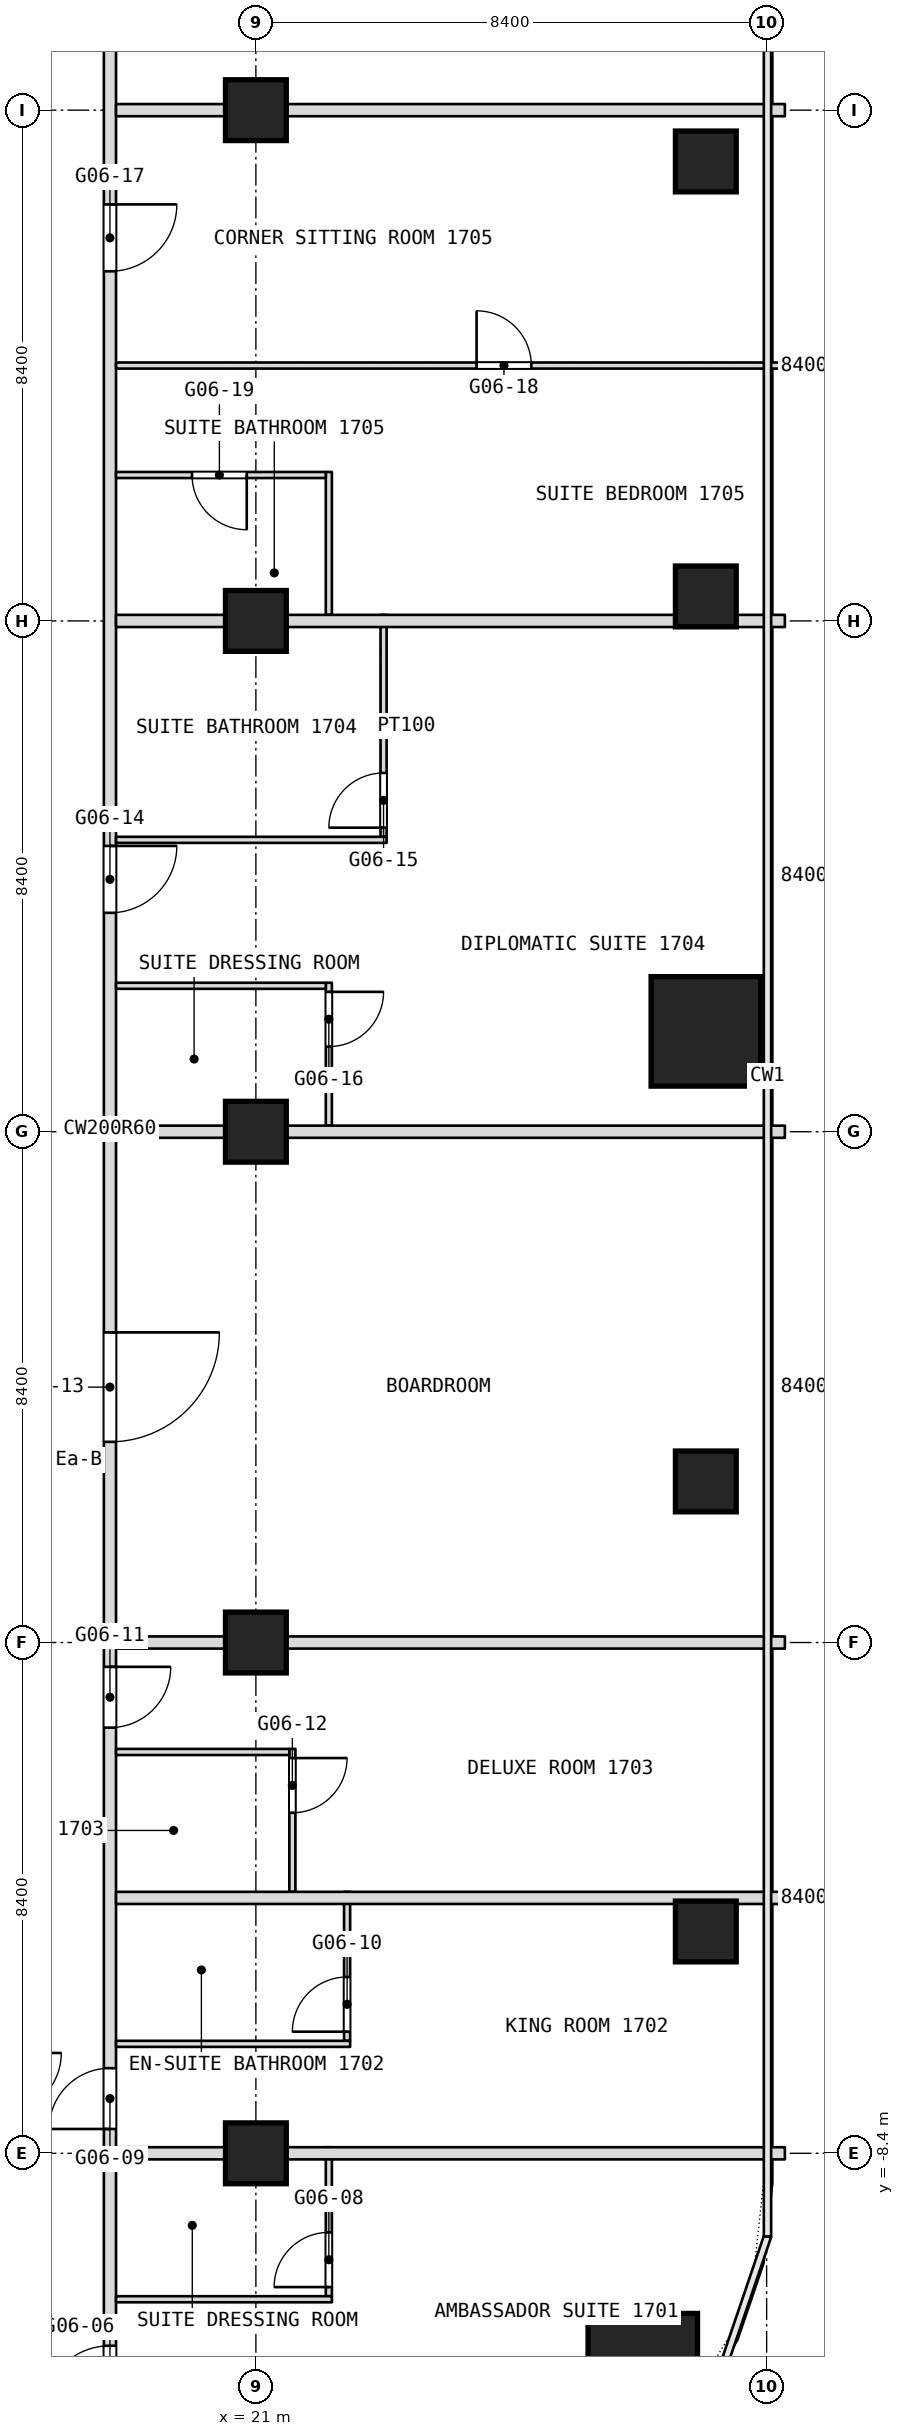
"""IFC4 building model, lengths in metres.
Left out: names, types, materials, properties, quantities, classifications, styles, units other than length and angle.
Written with IfcOpenShell. Run it as: python <this file> out.ifc"""

import sys

from ifc_helpers import new_model, si_unit, direction, frame, frame_2d, origin, origin_2d, place, context, subcontext, project, spatial, rectangle, extrude, element, fill, save


model = new_model("IFC4")
c1 = context("Model", 3, precision=1e-05, world=origin(), true_north=direction((0.0, 1.0)))
c2 = subcontext(c1, "Body", "Model", "MODEL_VIEW")
j1 = project(units=[si_unit("LENGTHUNIT", "METRE"), si_unit("PLANEANGLEUNIT", "RADIAN")], contexts=[c1])
p1 = place(None, origin())
s1 = spatial("IfcSite", under=j1, at=p1, CompositionType="ELEMENT")
p2 = place(p1, origin())
s2 = spatial("IfcBuilding", under=s1, at=p2, CompositionType="ELEMENT")
p3 = place(p2, frame((0.0, 0.0, 76.1)))
s3 = spatial("IfcBuildingStorey", under=s2, at=p3, CompositionType="ELEMENT", Elevation=76.1)
for number, where, z_axis, x_axis in (
    (1, (27.363, -11.933, 0.0), (0.0, 0.0, 1.0), (1.0, 0.0, 0.0)),
    (2, (28.4, 10.05, 0.0), (0.0, 0.0, 1.0), (1.0, 0.0, 0.0)),
):
    element("IfcColumn", number, at=place(p3, frame(where, z_axis=z_axis, x_axis=x_axis)), inside=s3, PredefinedType="COLUMN", context=c2, shape_type="SweptSolid", body=[
        extrude(rectangle(XDim=1.8, YDim=1.8, at=origin_2d()), origin(), (0.0, 0.0, 1.0), 3.6),
    ])
for number, where, z_axis, x_axis in (
    (3, (21.0, -8.4, 0.0), (0.0, 0.0, 1.0), (1.0, 0.0, 0.0)),
    (4, (21.0, 0.0, 0.0), (0.0, 0.0, 1.0), (1.0, 0.0, 0.0)),
    (5, (21.0, 8.4, 0.0), (0.0, 0.0, 1.0), (1.0, 0.0, 0.0)),
    (6, (21.0, 16.8, 0.0), (0.0, 0.0, 1.0), (1.0, 0.0, 0.0)),
    (7, (21.0, 25.2, 0.0), (0.0, 0.0, 1.0), (1.0, 0.0, 0.0)),
    (8, (28.4, 24.356, 0.0), (0.0, 0.0, 1.0), (1.0, 0.0, 0.0)),
    (9, (28.4, 17.203, 0.0), (0.0, 0.0, 1.0), (1.0, 0.0, 0.0)),
    (10, (28.4, 2.649, 0.0), (0.0, 0.0, 1.0), (1.0, 0.0, 0.0)),
    (11, (28.4, -4.752, 0.0), (0.0, 0.0, 1.0), (1.0, 0.0, 0.0)),
):
    element("IfcColumn", number, at=place(p3, frame(where, z_axis=z_axis, x_axis=x_axis)), inside=s3, PredefinedType="COLUMN", context=c2, shape_type="SweptSolid", body=[
        extrude(rectangle(XDim=1.0, YDim=1.0, at=origin_2d()), origin(), (0.0, 0.0, 1.0), 3.6),
    ])
p4 = place(p3, frame((23.1, 13.25, 0.0), z_axis=(0.0, 0.0, 1.0), x_axis=(0.0, 1.0, 0.0)))
e12 = element("IfcWall", 12, at=p4, inside=s3, PredefinedType="PARTITIONING", context=c2, shape_type="SweptSolid", body=[
    extrude(rectangle(XDim=3.65, YDim=0.1, at=frame_2d((1.825, 0.0))), origin(), (0.0, 0.0, 1.0), 3.34),
])
p5 = place(p4, frame((0.15, 0.0, 0.0)))
e13 = element("IfcOpeningElement", 13, at=p5, cuts=e12, PredefinedType="OPENING", context=c2, shape_type="SweptSolid", body=[
    extrude(rectangle(XDim=0.9, YDim=2.1, at=frame_2d((0.45, 1.05))), frame((0.0, 0.05, 0.0), z_axis=(0.0, -1.0, 0.0), x_axis=(1.0, 0.0, 0.0)), (0.0, 0.0, 1.0), 0.1),
])
p6 = place(p3, frame((22.5, -6.55, 0.0), z_axis=(0.0, 0.0, 1.0), x_axis=(0.0, 1.0, 0.0)))
e14 = element("IfcWall", 14, at=p6, inside=s3, PredefinedType="PARTITIONING", context=c2, shape_type="SweptSolid", body=[
    extrude(rectangle(XDim=2.45, YDim=0.1, at=frame_2d((1.225, 0.0))), origin(), (0.0, 0.0, 1.0), 3.34),
])
p7 = place(p6, frame((0.15, 0.0, 0.0)))
e15 = element("IfcOpeningElement", 15, at=p7, cuts=e14, PredefinedType="OPENING", context=c2, shape_type="SweptSolid", body=[
    extrude(rectangle(XDim=0.9, YDim=2.1, at=frame_2d((0.45, 1.05))), frame((0.0, 0.05, 0.0), z_axis=(0.0, -1.0, 0.0), x_axis=(1.0, 0.0, 0.0)), (0.0, 0.0, 1.0), 0.1),
])
p8 = place(p3, frame((22.2, -10.75, 0.0), z_axis=(0.0, 0.0, 1.0), x_axis=(0.0, 1.0, 0.0)))
e16 = element("IfcWall", 16, at=p8, inside=s3, PredefinedType="PARTITIONING", context=c2, shape_type="SweptSolid", body=[
    extrude(rectangle(XDim=2.45, YDim=0.1, at=frame_2d((1.225, 0.0))), origin(), (0.0, 0.0, 1.0), 3.34),
])
p9 = place(p8, frame((0.15, 0.0, 0.0)))
e17 = element("IfcOpeningElement", 17, at=p9, cuts=e16, PredefinedType="OPENING", context=c2, shape_type="SweptSolid", body=[
    extrude(rectangle(XDim=0.9, YDim=2.1, at=frame_2d((0.45, 1.05))), frame((0.0, 0.05, 0.0), z_axis=(0.0, -1.0, 0.0), x_axis=(1.0, 0.0, 0.0)), (0.0, 0.0, 1.0), 0.1),
])
p10 = place(p3, frame((22.2, 8.5, 0.0), z_axis=(0.0, 0.0, 1.0), x_axis=(0.0, 1.0, 0.0)))
e18 = element("IfcWall", 18, at=p10, inside=s3, PredefinedType="PARTITIONING", context=c2, shape_type="SweptSolid", body=[
    extrude(rectangle(XDim=2.35, YDim=0.1, at=frame_2d((1.175, 0.0))), origin(), (0.0, 0.0, 1.0), 3.34),
])
p11 = place(p10, frame((1.3, 0.0, 0.0)))
e19 = element("IfcOpeningElement", 19, at=p11, cuts=e18, PredefinedType="OPENING", context=c2, shape_type="SweptSolid", body=[
    extrude(rectangle(XDim=0.9, YDim=2.1, at=frame_2d((0.45, 1.05))), frame((0.0, 0.05, 0.0), z_axis=(0.0, -1.0, 0.0), x_axis=(1.0, 0.0, 0.0)), (0.0, 0.0, 1.0), 0.1),
])
p12 = place(p3, frame((22.2, 16.9, 0.0), z_axis=(0.0, 0.0, 1.0), x_axis=(0.0, 1.0, 0.0)))
e20 = element("IfcWall", 20, at=p12, inside=s3, PredefinedType="PARTITIONING", context=c2, shape_type="SweptSolid", body=[
    extrude(rectangle(XDim=2.35, YDim=0.1, at=frame_2d((1.175, 0.0))), origin(), (0.0, 0.0, 1.0), 3.34),
])
p13 = place(p3, frame((21.6, -4.1, 0.0), z_axis=(0.0, 0.0, 1.0), x_axis=(0.0, 1.0, 0.0)))
e21 = element("IfcWall", 21, at=p13, inside=s3, PredefinedType="PARTITIONING", context=c2, shape_type="SweptSolid", body=[
    extrude(rectangle(XDim=2.35, YDim=0.1, at=frame_2d((1.175, 0.0))), origin(), (0.0, 0.0, 1.0), 3.34),
])
p14 = place(p13, frame((1.3, 0.0, 0.0)))
e22 = element("IfcOpeningElement", 22, at=p14, cuts=e21, PredefinedType="OPENING", context=c2, shape_type="SweptSolid", body=[
    extrude(rectangle(XDim=0.9, YDim=2.1, at=frame_2d((0.45, 1.05))), frame((0.0, 0.05, 0.0), z_axis=(0.0, -1.0, 0.0), x_axis=(1.0, 0.0, 0.0)), (0.0, 0.0, 1.0), 0.1),
])
p15 = place(p3, frame((18.6, -16.665, 0.0), z_axis=(0.0, 0.0, 1.0), x_axis=(0.0, 1.0, 0.0)))
e23 = element("IfcWall", 23, at=p15, inside=s3, PredefinedType="PARTITIONING", context=c2, shape_type="SweptSolid", body=[
    extrude(rectangle(XDim=50.205, YDim=0.2, at=frame_2d((25.103, 0.0))), origin(), (0.0, 0.0, 1.0), 3.34),
])
p16 = place(p15, frame((4.0, 0.0, 0.0)))
e24 = element("IfcOpeningElement", 24, at=p16, cuts=e23, PredefinedType="OPENING", context=c2, shape_type="SweptSolid", body=[
    extrude(rectangle(XDim=1.1, YDim=2.1, at=frame_2d((0.55, 1.05))), frame((0.0, 0.1, 0.0), z_axis=(0.0, -1.0, 0.0), x_axis=(1.0, 0.0, 0.0)), (0.0, 0.0, 1.0), 0.2),
])
p17 = place(p15, frame((8.665, 0.0, 0.0)))
e25 = element("IfcOpeningElement", 25, at=p17, cuts=e23, PredefinedType="OPENING", context=c2, shape_type="SweptSolid", body=[
    extrude(rectangle(XDim=1.0, YDim=2.1, at=frame_2d((0.5, 1.05))), frame((0.0, 0.1, 0.0), z_axis=(0.0, -1.0, 0.0), x_axis=(1.0, 0.0, 0.0)), (0.0, 0.0, 1.0), 0.2),
])
p18 = place(p15, frame((15.265, 0.0, 0.0)))
e26 = element("IfcOpeningElement", 26, at=p18, cuts=e23, PredefinedType="OPENING", context=c2, shape_type="SweptSolid", body=[
    extrude(rectangle(XDim=1.0, YDim=2.1, at=frame_2d((0.5, 1.05))), frame((0.0, 0.1, 0.0), z_axis=(0.0, -1.0, 0.0), x_axis=(1.0, 0.0, 0.0)), (0.0, 0.0, 1.0), 0.2),
])
p19 = place(p15, frame((19.965, 0.0, 0.0)))
e27 = element("IfcOpeningElement", 27, at=p19, cuts=e23, PredefinedType="OPENING", context=c2, shape_type="SweptSolid", body=[
    extrude(rectangle(XDim=1.8, YDim=2.1, at=frame_2d((0.9, 1.05))), frame((0.0, 0.1, 0.0), z_axis=(0.0, -1.0, 0.0), x_axis=(1.0, 0.0, 0.0)), (0.0, 0.0, 1.0), 0.2),
])
p20 = place(p15, frame((28.665, 0.0, 0.0)))
e28 = element("IfcOpeningElement", 28, at=p20, cuts=e23, PredefinedType="OPENING", context=c2, shape_type="SweptSolid", body=[
    extrude(rectangle(XDim=1.1, YDim=2.1, at=frame_2d((0.55, 1.05))), frame((0.0, 0.1, 0.0), z_axis=(0.0, -1.0, 0.0), x_axis=(1.0, 0.0, 0.0)), (0.0, 0.0, 1.0), 0.2),
])
p21 = place(p15, frame((39.215, 0.0, 0.0)))
e29 = element("IfcOpeningElement", 29, at=p21, cuts=e23, PredefinedType="OPENING", context=c2, shape_type="SweptSolid", body=[
    extrude(rectangle(XDim=1.1, YDim=2.1, at=frame_2d((0.55, 1.05))), frame((0.0, 0.1, 0.0), z_axis=(0.0, -1.0, 0.0), x_axis=(1.0, 0.0, 0.0)), (0.0, 0.0, 1.0), 0.2),
])
p22 = place(p15, frame((45.165, 0.0, 0.0)))
e30 = element("IfcOpeningElement", 30, at=p22, cuts=e23, PredefinedType="OPENING", context=c2, shape_type="SweptSolid", body=[
    extrude(rectangle(XDim=1.8, YDim=2.1, at=frame_2d((0.9, 1.05))), frame((0.0, 0.1, 0.0), z_axis=(0.0, -1.0, 0.0), x_axis=(1.0, 0.0, 0.0)), (0.0, 0.0, 1.0), 0.2),
])
p23 = place(p3, frame((18.7, -10.8, 0.0), z_axis=(0.0, 0.0, 1.0), x_axis=(1.0, 0.0, 0.0)))
e31 = element("IfcWall", 31, at=p23, inside=s3, PredefinedType="PARTITIONING", context=c2, shape_type="SweptSolid", body=[
    extrude(rectangle(XDim=3.55, YDim=0.1, at=frame_2d((1.775, 0.0))), origin(), (0.0, 0.0, 1.0), 3.34),
])
p24 = place(p3, frame((18.7, -8.4, 0.0), z_axis=(0.0, 0.0, 1.0), x_axis=(1.0, 0.0, 0.0)))
e32 = element("IfcWall", 32, at=p24, inside=s3, PredefinedType="PARTITIONING", context=c2, shape_type="SweptSolid", body=[
    extrude(rectangle(XDim=11.0, YDim=0.2, at=frame_2d((5.5, 0.0))), origin(), (0.0, 0.0, 1.0), 2.84),
])
p25 = place(p3, frame((18.7, -6.6, 0.0), z_axis=(0.0, 0.0, 1.0), x_axis=(1.0, 0.0, 0.0)))
e33 = element("IfcWall", 33, at=p25, inside=s3, PredefinedType="PARTITIONING", context=c2, shape_type="SweptSolid", body=[
    extrude(rectangle(XDim=3.85, YDim=0.1, at=frame_2d((1.925, 0.0))), origin(), (0.0, 0.0, 1.0), 3.34),
])
p26 = place(p3, frame((18.7, -4.2, 0.0), z_axis=(0.0, 0.0, 1.0), x_axis=(1.0, 0.0, 0.0)))
e34 = element("IfcWall", 34, at=p26, inside=s3, PredefinedType="PARTITIONING", context=c2, shape_type="SweptSolid", body=[
    extrude(rectangle(XDim=11.0, YDim=0.2, at=frame_2d((5.5, 0.0))), origin(), (0.0, 0.0, 1.0), 3.34),
])
p27 = place(p3, frame((18.7, -1.8, 0.0), z_axis=(0.0, 0.0, 1.0), x_axis=(1.0, 0.0, 0.0)))
e35 = element("IfcWall", 35, at=p27, inside=s3, PredefinedType="PARTITIONING", context=c2, shape_type="SweptSolid", body=[
    extrude(rectangle(XDim=2.85, YDim=0.1, at=frame_2d((1.425, 0.0))), origin(), (0.0, 0.0, 1.0), 3.34),
])
for number, where, z_axis, x_axis in (
    (36, (18.7, 0.0, 0.0), (0.0, 0.0, 1.0), (1.0, 0.0, 0.0)),
    (37, (18.7, 8.4, 0.0), (0.0, 0.0, 1.0), (1.0, 0.0, 0.0)),
):
    element("IfcWall", number, at=place(p3, frame(where, z_axis=z_axis, x_axis=x_axis)), inside=s3, PredefinedType="PARTITIONING", context=c2, shape_type="SweptSolid", body=[
        extrude(rectangle(XDim=11.0, YDim=0.2, at=frame_2d((5.5, 0.0))), origin(), (0.0, 0.0, 1.0), 2.84),
    ])
p28 = place(p3, frame((18.7, 10.8, 0.0), z_axis=(0.0, 0.0, 1.0), x_axis=(1.0, 0.0, 0.0)))
e38 = element("IfcWall", 38, at=p28, inside=s3, PredefinedType="PARTITIONING", context=c2, shape_type="SweptSolid", body=[
    extrude(rectangle(XDim=3.45, YDim=0.1, at=frame_2d((1.725, 0.0))), origin(), (0.0, 0.0, 1.0), 3.34),
])
p29 = place(p3, frame((18.7, 13.2, 0.0), z_axis=(0.0, 0.0, 1.0), x_axis=(1.0, 0.0, 0.0)))
e39 = element("IfcWall", 39, at=p29, inside=s3, PredefinedType="PARTITIONING", context=c2, shape_type="SweptSolid", body=[
    extrude(rectangle(XDim=4.45, YDim=0.1, at=frame_2d((2.225, 0.0))), origin(), (0.0, 0.0, 1.0), 3.34),
])
p30 = place(p3, frame((18.7, 16.8, 0.0), z_axis=(0.0, 0.0, 1.0), x_axis=(1.0, 0.0, 0.0)))
e40 = element("IfcWall", 40, at=p30, inside=s3, PredefinedType="PARTITIONING", context=c2, shape_type="SweptSolid", body=[
    extrude(rectangle(XDim=11.0, YDim=0.2, at=frame_2d((5.5, 0.0))), origin(), (0.0, 0.0, 1.0), 2.84),
])
p31 = place(p3, frame((18.7, 19.2, 0.0), z_axis=(0.0, 0.0, 1.0), x_axis=(1.0, 0.0, 0.0)))
e41 = element("IfcWall", 41, at=p31, inside=s3, PredefinedType="PARTITIONING", context=c2, shape_type="SweptSolid", body=[
    extrude(rectangle(XDim=3.45, YDim=0.1, at=frame_2d((1.725, 0.0))), origin(), (0.0, 0.0, 1.0), 3.34),
])
p32 = place(p31, frame((1.25, 0.0, 0.0)))
e42 = element("IfcOpeningElement", 42, at=p32, cuts=e41, PredefinedType="OPENING", context=c2, shape_type="SweptSolid", body=[
    extrude(rectangle(XDim=0.9, YDim=2.1, at=frame_2d((0.45, 1.05))), frame((0.0, 0.05, 0.0), z_axis=(0.0, -1.0, 0.0), x_axis=(1.0, 0.0, 0.0)), (0.0, 0.0, 1.0), 0.1),
])
p33 = place(p3, frame((18.7, 21.0, 0.0), z_axis=(0.0, 0.0, 1.0), x_axis=(1.0, 0.0, 0.0)))
e43 = element("IfcWall", 43, at=p33, inside=s3, PredefinedType="PARTITIONING", context=c2, shape_type="SweptSolid", body=[
    extrude(rectangle(XDim=11.0, YDim=0.1, at=frame_2d((5.5, 0.0))), origin(), (0.0, 0.0, 1.0), 3.34),
])
p34 = place(p33, frame((5.93, 0.0, 0.0)))
e44 = element("IfcOpeningElement", 44, at=p34, cuts=e43, PredefinedType="OPENING", context=c2, shape_type="SweptSolid", body=[
    extrude(rectangle(XDim=0.9, YDim=2.1, at=frame_2d((0.45, 1.05))), frame((0.0, 0.05, 0.0), z_axis=(0.0, -1.0, 0.0), x_axis=(1.0, 0.0, 0.0)), (0.0, 0.0, 1.0), 0.1),
])
p35 = place(p3, frame((18.7, 25.2, 0.0), z_axis=(0.0, 0.0, 1.0), x_axis=(1.0, 0.0, 0.0)))
e45 = element("IfcWall", 45, at=p35, inside=s3, PredefinedType="PARTITIONING", context=c2, shape_type="SweptSolid", body=[
    extrude(rectangle(XDim=11.0, YDim=0.2, at=frame_2d((5.5, 0.0))), origin(), (0.0, 0.0, 1.0), 2.84),
])
p36 = place(p5, origin())
e46 = element("IfcDoor", 46, at=p36, inside=s3, OperationType="SINGLE_SWING_LEFT", PredefinedType="DOOR", context=c2, shape_type="SweptSolid", body=[
    extrude(rectangle(XDim=0.9, YDim=2.1, at=frame_2d((0.45, 1.05))), frame((0.0, 0.025, 0.0), z_axis=(0.0, -1.0, 0.0), x_axis=(1.0, 0.0, 0.0)), (0.0, 0.0, 1.0), 0.05),
])
fill(e13, e46)
p37 = place(p7, origin())
e47 = element("IfcDoor", 47, at=p37, inside=s3, OperationType="SINGLE_SWING_LEFT", PredefinedType="DOOR", context=c2, shape_type="SweptSolid", body=[
    extrude(rectangle(XDim=0.9, YDim=2.1, at=frame_2d((0.45, 1.05))), frame((0.0, 0.025, 0.0), z_axis=(0.0, -1.0, 0.0), x_axis=(1.0, 0.0, 0.0)), (0.0, 0.0, 1.0), 0.05),
])
fill(e15, e47)
p38 = place(p9, origin())
e48 = element("IfcDoor", 48, at=p38, inside=s3, OperationType="SINGLE_SWING_LEFT", PredefinedType="DOOR", context=c2, shape_type="SweptSolid", body=[
    extrude(rectangle(XDim=0.9, YDim=2.1, at=frame_2d((0.45, 1.05))), frame((0.0, 0.025, 0.0), z_axis=(0.0, -1.0, 0.0), x_axis=(1.0, 0.0, 0.0)), (0.0, 0.0, 1.0), 0.05),
])
fill(e17, e48)
p39 = place(p11, origin())
e49 = element("IfcDoor", 49, at=p39, inside=s3, OperationType="SINGLE_SWING_RIGHT", PredefinedType="DOOR", context=c2, shape_type="SweptSolid", body=[
    extrude(rectangle(XDim=0.9, YDim=2.1, at=frame_2d((0.45, 1.05))), frame((0.0, 0.025, 0.0), z_axis=(0.0, -1.0, 0.0), x_axis=(1.0, 0.0, 0.0)), (0.0, 0.0, 1.0), 0.05),
])
fill(e19, e49)
p40 = place(p14, origin())
e50 = element("IfcDoor", 50, at=p40, inside=s3, OperationType="SINGLE_SWING_RIGHT", PredefinedType="DOOR", context=c2, shape_type="SweptSolid", body=[
    extrude(rectangle(XDim=0.9, YDim=2.1, at=frame_2d((0.45, 1.05))), frame((0.0, 0.025, 0.0), z_axis=(0.0, -1.0, 0.0), x_axis=(1.0, 0.0, 0.0)), (0.0, 0.0, 1.0), 0.05),
])
fill(e22, e50)
p41 = place(p16, origin())
e51 = element("IfcDoor", 51, at=p41, inside=s3, OperationType="SINGLE_SWING_RIGHT", PredefinedType="DOOR", context=c2, shape_type="SweptSolid", body=[
    extrude(rectangle(XDim=1.1, YDim=2.1, at=frame_2d((0.55, 1.05))), frame((0.0, 0.025, 0.0), z_axis=(0.0, -1.0, 0.0), x_axis=(1.0, 0.0, 0.0)), (0.0, 0.0, 1.0), 0.05),
])
fill(e24, e51)
p42 = place(p17, origin())
e52 = element("IfcDoor", 52, at=p42, inside=s3, OperationType="SINGLE_SWING_LEFT", PredefinedType="DOOR", context=c2, shape_type="SweptSolid", body=[
    extrude(rectangle(XDim=1.0, YDim=2.1, at=frame_2d((0.5, 1.05))), frame((0.0, 0.025, 0.0), z_axis=(0.0, -1.0, 0.0), x_axis=(1.0, 0.0, 0.0)), (0.0, 0.0, 1.0), 0.05),
])
fill(e25, e52)
p43 = place(p18, origin())
e53 = element("IfcDoor", 53, at=p43, inside=s3, OperationType="SINGLE_SWING_LEFT", PredefinedType="DOOR", context=c2, shape_type="SweptSolid", body=[
    extrude(rectangle(XDim=1.0, YDim=2.1, at=frame_2d((0.5, 1.05))), frame((0.0, 0.025, 0.0), z_axis=(0.0, -1.0, 0.0), x_axis=(1.0, 0.0, 0.0)), (0.0, 0.0, 1.0), 0.05),
])
fill(e26, e53)
p44 = place(p19, origin())
e54 = element("IfcDoor", 54, at=p44, inside=s3, OperationType="DOUBLE_DOOR_SINGLE_SWING", PredefinedType="DOOR", context=c2, shape_type="SweptSolid", body=[
    extrude(rectangle(XDim=1.8, YDim=2.1, at=frame_2d((0.9, 1.05))), frame((0.0, 0.025, 0.0), z_axis=(0.0, -1.0, 0.0), x_axis=(1.0, 0.0, 0.0)), (0.0, 0.0, 1.0), 0.05),
])
fill(e27, e54)
p45 = place(p20, origin())
e55 = element("IfcDoor", 55, at=p45, inside=s3, OperationType="SINGLE_SWING_LEFT", PredefinedType="DOOR", context=c2, shape_type="SweptSolid", body=[
    extrude(rectangle(XDim=1.1, YDim=2.1, at=frame_2d((0.55, 1.05))), frame((0.0, 0.025, 0.0), z_axis=(0.0, -1.0, 0.0), x_axis=(1.0, 0.0, 0.0)), (0.0, 0.0, 1.0), 0.05),
])
fill(e28, e55)
p46 = place(p21, origin())
e56 = element("IfcDoor", 56, at=p46, inside=s3, OperationType="SINGLE_SWING_LEFT", PredefinedType="DOOR", context=c2, shape_type="SweptSolid", body=[
    extrude(rectangle(XDim=1.1, YDim=2.1, at=frame_2d((0.55, 1.05))), frame((0.0, 0.025, 0.0), z_axis=(0.0, -1.0, 0.0), x_axis=(1.0, 0.0, 0.0)), (0.0, 0.0, 1.0), 0.05),
])
fill(e29, e56)
p47 = place(p32, origin())
e57 = element("IfcDoor", 57, at=p47, inside=s3, OperationType="SINGLE_SWING_RIGHT", PredefinedType="DOOR", context=c2, shape_type="SweptSolid", body=[
    extrude(rectangle(XDim=0.9, YDim=2.1, at=frame_2d((0.45, 1.05))), frame((0.0, 0.025, 0.0), z_axis=(0.0, -1.0, 0.0), x_axis=(1.0, 0.0, 0.0)), (0.0, 0.0, 1.0), 0.05),
])
fill(e42, e57)
p48 = place(p34, origin())
e58 = element("IfcDoor", 58, at=p48, inside=s3, OperationType="SINGLE_SWING_RIGHT", PredefinedType="DOOR", context=c2, shape_type="SweptSolid", body=[
    extrude(rectangle(XDim=0.9, YDim=2.1, at=frame_2d((0.45, 1.05))), frame((0.0, 0.025, 0.0), z_axis=(0.0, -1.0, 0.0), x_axis=(1.0, 0.0, 0.0)), (0.0, 0.0, 1.0), 0.05),
])
fill(e44, e58)
save(model, sys.argv[1])
